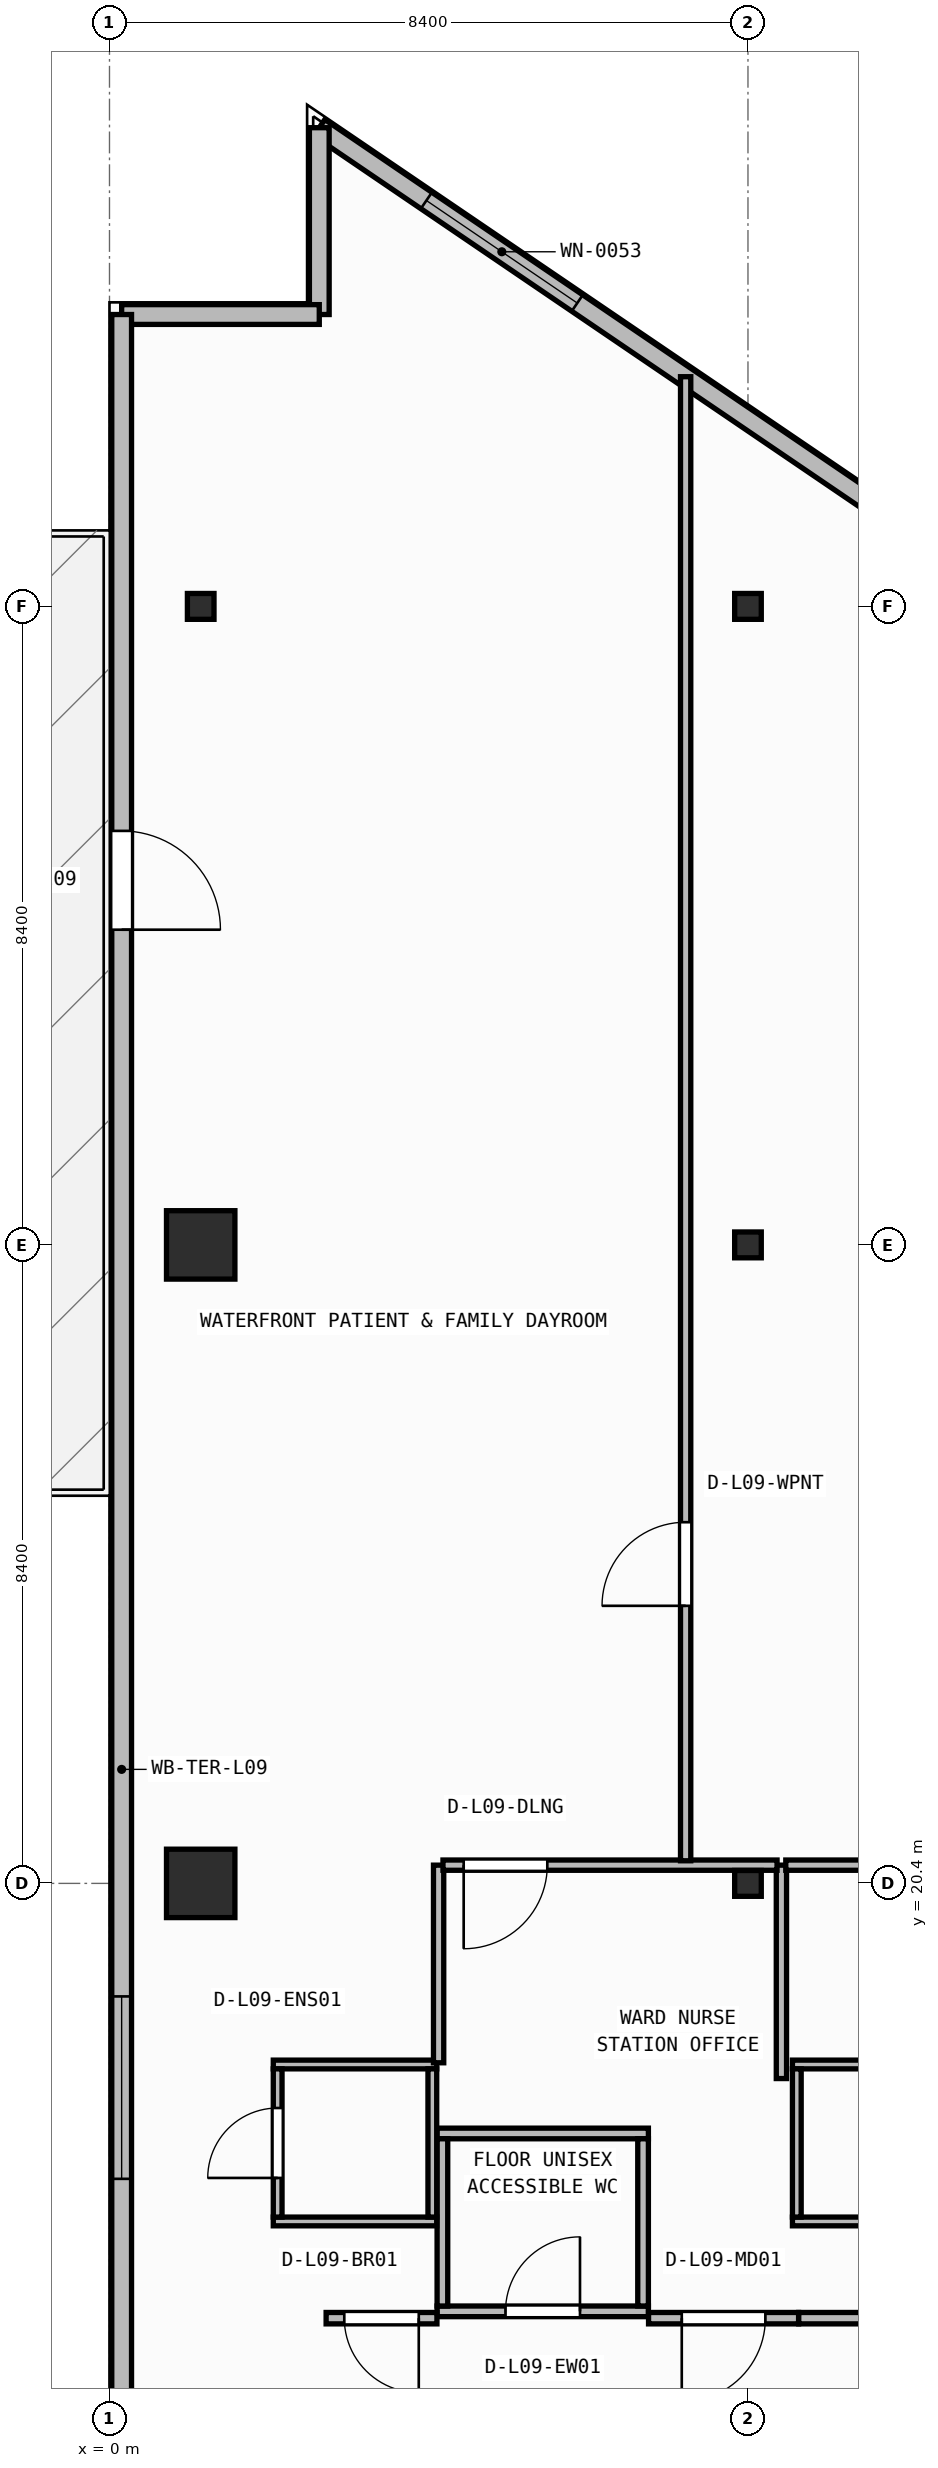
"""IFC4 building model, lengths in metres.
Left out: names, types, materials, properties, quantities, classifications, styles, units other than length and angle.
Written with IfcOpenShell. Run it as: python <this file> out.ifc"""

import sys

from ifc_helpers import new_model, si_unit, direction, frame, frame_2d, origin, origin_2d, place, context, subcontext, project, spatial, rectangle, i_section, extrude, element, fill, save


model = new_model("IFC4")
c1 = context("Model", 3, precision=1e-05, world=origin(), true_north=direction((0.0, 1.0)))
c2 = subcontext(c1, "Body", "Model", "MODEL_VIEW")
j1 = project(units=[si_unit("LENGTHUNIT", "METRE"), si_unit("PLANEANGLEUNIT", "RADIAN")], contexts=[c1])
p1 = place(None, origin())
s1 = spatial("IfcSite", under=j1, at=p1, CompositionType="ELEMENT")
p2 = place(p1, origin())
s2 = spatial("IfcBuilding", under=s1, at=p2, CompositionType="ELEMENT")
p3 = place(p2, frame((0.0, 0.0, 38.3)))
s3 = spatial("IfcBuildingStorey", under=s2, at=p3, CompositionType="ELEMENT", Elevation=38.3)
p4 = place(p3, frame((1.2, 20.4, 0.0), z_axis=(0.0, 0.0, 1.0), x_axis=(1.0, 0.0, 0.0)))
e1 = element("IfcColumn", 1, at=p4, inside=s3, PredefinedType="COLUMN", context=c2, shape_type="SweptSolid", body=[
    extrude(rectangle(XDim=0.9, YDim=0.9, at=origin_2d()), origin(), (0.0, 0.0, 1.0), 3.95),
])
p5 = place(p3, frame((8.4, 20.4, 0.0), z_axis=(0.0, 0.0, 1.0), x_axis=(1.0, 0.0, 0.0)))
e2 = element("IfcColumn", 2, at=p5, inside=s3, PredefinedType="COLUMN", context=c2, shape_type="SweptSolid", body=[
    extrude(i_section(OverallWidth=0.35, OverallDepth=0.34, WebThickness=0.016, FlangeThickness=0.028, at=origin_2d()), origin(), (0.0, 0.0, 1.0), 3.95),
])
p6 = place(p3, frame((1.2, 28.8, 0.0), z_axis=(0.0, 0.0, 1.0), x_axis=(1.0, 0.0, 0.0)))
e3 = element("IfcColumn", 3, at=p6, inside=s3, PredefinedType="COLUMN", context=c2, shape_type="SweptSolid", body=[
    extrude(rectangle(XDim=0.9, YDim=0.9, at=origin_2d()), origin(), (0.0, 0.0, 1.0), 3.95),
])
for number, where, z_axis, x_axis in (
    (4, (8.4, 28.8, 0.0), (0.0, 0.0, 1.0), (1.0, 0.0, 0.0)),
    (5, (1.2, 37.2, 0.0), (0.0, 0.0, 1.0), (1.0, 0.0, 0.0)),
    (6, (8.4, 37.2, 0.0), (0.0, 0.0, 1.0), (1.0, 0.0, 0.0)),
):
    element("IfcColumn", number, at=place(p3, frame(where, z_axis=z_axis, x_axis=x_axis)), inside=s3, PredefinedType="COLUMN", context=c2, shape_type="SweptSolid", body=[
        extrude(i_section(OverallWidth=0.35, OverallDepth=0.34, WebThickness=0.016, FlangeThickness=0.028, at=origin_2d()), origin(), (0.0, 0.0, 1.0), 3.95),
    ])
p7 = place(p3, frame((11.561, 37.517, 0.0), z_axis=(0.0, 0.0, 1.0), x_axis=(-0.827064743936, 0.562106670782, 0.0)))
e7 = element("IfcWall", 7, at=p7, inside=s3, PredefinedType="STANDARD", context=c2, shape_type="SweptSolid", body=[
    extrude(rectangle(XDim=10.641, YDim=0.26, at=frame_2d((5.32, 0.0))), origin(), (0.0, 0.0, 1.0), 3.71),
])
p8 = place(p7, frame((6.537, 0.0, 0.9)))
e8 = element("IfcOpeningElement", 8, at=p8, cuts=e7, PredefinedType="OPENING", context=c2, shape_type="SweptSolid", body=[
    extrude(rectangle(XDim=2.4, YDim=1.65, at=frame_2d((1.2, 0.825))), frame((0.0, 0.14, 0.0), z_axis=(0.0, -1.0, 0.0), x_axis=(1.0, 0.0, 0.0)), (0.0, 0.0, 1.0), 0.28),
])
p9 = place(p3, frame((2.76, 43.498, 0.0), z_axis=(0.0, 0.0, 1.0), x_axis=(0.0, -1.0, 0.0)))
e9 = element("IfcWall", 9, at=p9, inside=s3, PredefinedType="STANDARD", context=c2, shape_type="SweptSolid", body=[
    extrude(rectangle(XDim=2.458, YDim=0.26, at=frame_2d((1.229, 0.0))), origin(), (0.0, 0.0, 1.0), 3.71),
])
p10 = place(p3, frame((2.76, 41.04, 0.0), z_axis=(0.0, 0.0, 1.0), x_axis=(-1.0, 0.0, 0.0)))
e10 = element("IfcWall", 10, at=p10, inside=s3, PredefinedType="STANDARD", context=c2, shape_type="SweptSolid", body=[
    extrude(rectangle(XDim=2.6, YDim=0.26, at=frame_2d((1.3, 0.0))), origin(), (0.0, 0.0, 1.0), 3.71),
])
p11 = place(p3, frame((0.16, 41.04, 0.0), z_axis=(0.0, 0.0, 1.0), x_axis=(0.0, -1.0, 0.0)))
e11 = element("IfcWall", 11, at=p11, inside=s3, PredefinedType="STANDARD", context=c2, shape_type="SweptSolid", body=[
    extrude(rectangle(XDim=38.28, YDim=0.26, at=frame_2d((19.14, 0.0))), origin(), (0.0, 0.0, 1.0), 3.71),
])
p12 = place(p11, frame((6.793, 0.0, 0.0)))
e12 = element("IfcOpeningElement", 12, at=p12, cuts=e11, PredefinedType="OPENING", context=c2, shape_type="SweptSolid", body=[
    extrude(rectangle(XDim=1.3, YDim=2.15, at=frame_2d((0.65, 1.075))), frame((0.0, 0.14, 0.0), z_axis=(0.0, -1.0, 0.0), x_axis=(1.0, 0.0, 0.0)), (0.0, 0.0, 1.0), 0.28),
])
p13 = place(p11, frame((22.127, 0.0, 0.9)))
e13 = element("IfcOpeningElement", 13, at=p13, cuts=e11, PredefinedType="OPENING", context=c2, shape_type="SweptSolid", body=[
    extrude(rectangle(XDim=2.4, YDim=1.65, at=frame_2d((1.2, 0.825))), frame((0.0, 0.14, 0.0), z_axis=(0.0, -1.0, 0.0), x_axis=(1.0, 0.0, 0.0)), (0.0, 0.0, 1.0), 0.28),
])
p14 = place(p3, frame((4.31, 14.77, 0.0), z_axis=(0.0, 0.0, 1.0), x_axis=(1.0, 0.0, 0.0)))
e14 = element("IfcWall", 14, at=p14, inside=s3, PredefinedType="PARTITIONING", context=c2, shape_type="SweptSolid", body=[
    extrude(rectangle(XDim=2.78, YDim=0.14, at=frame_2d((1.39, 0.0))), origin(), (0.0, 0.0, 1.0), 3.71),
])
p15 = place(p14, frame((0.9, 0.0, 0.0)))
e15 = element("IfcOpeningElement", 15, at=p15, cuts=e14, PredefinedType="OPENING", context=c2, shape_type="SweptSolid", body=[
    extrude(rectangle(XDim=0.98, YDim=2.1, at=frame_2d((0.49, 1.05))), frame((0.0, 0.08, 0.0), z_axis=(0.0, -1.0, 0.0), x_axis=(1.0, 0.0, 0.0)), (0.0, 0.0, 1.0), 0.16),
])
p16 = place(p3, frame((4.31, 17.11, 0.0), z_axis=(0.0, 0.0, 1.0), x_axis=(1.0, 0.0, 0.0)))
e16 = element("IfcWall", 16, at=p16, inside=s3, PredefinedType="PARTITIONING", context=c2, shape_type="SweptSolid", body=[
    extrude(rectangle(XDim=2.78, YDim=0.14, at=frame_2d((1.39, 0.0))), origin(), (0.0, 0.0, 1.0), 3.71),
])
for number, where, z_axis, x_axis in (
    (17, (4.38, 14.84, 0.0), (0.0, 0.0, 1.0), (0.0, 1.0, 0.0)),
    (18, (7.02, 14.84, 0.0), (0.0, 0.0, 1.0), (0.0, 1.0, 0.0)),
):
    element("IfcWall", number, at=place(p3, frame(where, z_axis=z_axis, x_axis=x_axis)), inside=s3, PredefinedType="PARTITIONING", context=c2, shape_type="SweptSolid", body=[
        extrude(rectangle(XDim=2.2, YDim=0.14, at=frame_2d((1.1, 0.0))), origin(), (0.0, 0.0, 1.0), 3.71),
    ])
for number, where, z_axis, x_axis in (
    (19, (2.155, 15.952, 0.0), (0.0, 0.0, 1.0), (1.0, 0.0, 0.0)),
    (20, (2.155, 18.018, 0.0), (0.0, 0.0, 1.0), (1.0, 0.0, 0.0)),
):
    element("IfcWall", number, at=place(p3, frame(where, z_axis=z_axis, x_axis=x_axis)), inside=s3, PredefinedType="PARTITIONING", context=c2, shape_type="SweptSolid", body=[
        extrude(rectangle(XDim=2.15, YDim=0.115, at=frame_2d((1.075, 0.0))), origin(), (0.0, 0.0, 1.0), 3.71),
    ])
p17 = place(p3, frame((2.212, 16.01, 0.0), z_axis=(0.0, 0.0, 1.0), x_axis=(0.0, 1.0, 0.0)))
e21 = element("IfcWall", 21, at=p17, inside=s3, PredefinedType="PARTITIONING", context=c2, shape_type="SweptSolid", body=[
    extrude(rectangle(XDim=1.95, YDim=0.115, at=frame_2d((0.975, 0.0))), origin(), (0.0, 0.0, 1.0), 3.71),
])
p18 = place(p17, frame((0.515, 0.0, 0.0)))
e22 = element("IfcOpeningElement", 22, at=p18, cuts=e21, PredefinedType="OPENING", context=c2, shape_type="SweptSolid", body=[
    extrude(rectangle(XDim=0.92, YDim=2.1, at=frame_2d((0.46, 1.05))), frame((0.0, 0.067, 0.0), z_axis=(0.0, -1.0, 0.0), x_axis=(1.0, 0.0, 0.0)), (0.0, 0.0, 1.0), 0.135),
])
p19 = place(p3, frame((4.248, 16.01, 0.0), z_axis=(0.0, 0.0, 1.0), x_axis=(0.0, 1.0, 0.0)))
e23 = element("IfcWall", 23, at=p19, inside=s3, PredefinedType="PARTITIONING", context=c2, shape_type="SweptSolid", body=[
    extrude(rectangle(XDim=1.95, YDim=0.115, at=frame_2d((0.975, 0.0))), origin(), (0.0, 0.0, 1.0), 3.71),
])
for number, where, z_axis, x_axis in (
    (24, (8.985, 15.952, 0.0), (0.0, 0.0, 1.0), (1.0, 0.0, 0.0)),
    (25, (8.985, 18.018, 0.0), (0.0, 0.0, 1.0), (1.0, 0.0, 0.0)),
):
    element("IfcWall", number, at=place(p3, frame(where, z_axis=z_axis, x_axis=x_axis)), inside=s3, PredefinedType="PARTITIONING", context=c2, shape_type="SweptSolid", body=[
        extrude(rectangle(XDim=2.15, YDim=0.115, at=frame_2d((1.075, 0.0))), origin(), (0.0, 0.0, 1.0), 3.71),
    ])
p20 = place(p3, frame((9.042, 16.01, 0.0), z_axis=(0.0, 0.0, 1.0), x_axis=(0.0, 1.0, 0.0)))
e26 = element("IfcWall", 26, at=p20, inside=s3, PredefinedType="PARTITIONING", context=c2, shape_type="SweptSolid", body=[
    extrude(rectangle(XDim=1.95, YDim=0.115, at=frame_2d((0.975, 0.0))), origin(), (0.0, 0.0, 1.0), 3.71),
])
p21 = place(p3, frame((4.308, 14.68, 0.0), z_axis=(0.0, 0.0, 1.0), x_axis=(-1.0, 0.0, 0.0)))
e27 = element("IfcWall", 27, at=p21, inside=s3, PredefinedType="PARTITIONING", context=c2, shape_type="SweptSolid", body=[
    extrude(rectangle(XDim=1.458, YDim=0.15, at=frame_2d((0.729, 0.0))), origin(), (0.0, 0.0, 1.0), 3.71),
])
p22 = place(p21, frame((0.239, 0.0, 0.0)))
e28 = element("IfcOpeningElement", 28, at=p22, cuts=e27, PredefinedType="OPENING", context=c2, shape_type="SweptSolid", body=[
    extrude(rectangle(XDim=0.98, YDim=2.1, at=frame_2d((0.49, 1.05))), frame((0.0, 0.085, 0.0), z_axis=(0.0, -1.0, 0.0), x_axis=(1.0, 0.0, 0.0)), (0.0, 0.0, 1.0), 0.17),
])
p23 = place(p3, frame((9.066, 14.68, 0.0), z_axis=(0.0, 0.0, 1.0), x_axis=(-1.0, 0.0, 0.0)))
e29 = element("IfcWall", 29, at=p23, inside=s3, PredefinedType="PARTITIONING", context=c2, shape_type="SweptSolid", body=[
    extrude(rectangle(XDim=1.974, YDim=0.15, at=frame_2d((0.987, 0.0))), origin(), (0.0, 0.0, 1.0), 3.71),
])
p24 = place(p23, frame((0.437, 0.0, 0.0)))
e30 = element("IfcOpeningElement", 30, at=p24, cuts=e29, PredefinedType="OPENING", context=c2, shape_type="SweptSolid", body=[
    extrude(rectangle(XDim=1.1, YDim=2.1, at=frame_2d((0.55, 1.05))), frame((0.0, 0.085, 0.0), z_axis=(0.0, -1.0, 0.0), x_axis=(1.0, 0.0, 0.0)), (0.0, 0.0, 1.0), 0.17),
])
p25 = place(p3, frame((13.936, 14.68, 0.0), z_axis=(0.0, 0.0, 1.0), x_axis=(-1.0, 0.0, 0.0)))
e31 = element("IfcWall", 31, at=p25, inside=s3, PredefinedType="PARTITIONING", context=c2, shape_type="SweptSolid", body=[
    extrude(rectangle(XDim=4.868, YDim=0.15, at=frame_2d((2.434, 0.0))), origin(), (0.0, 0.0, 1.0), 3.71),
])
p26 = place(p25, frame((1.784, 0.0, 0.0)))
e32 = element("IfcOpeningElement", 32, at=p26, cuts=e31, PredefinedType="OPENING", context=c2, shape_type="SweptSolid", body=[
    extrude(rectangle(XDim=1.3, YDim=2.15, at=frame_2d((0.65, 1.075))), frame((0.0, 0.085, 0.0), z_axis=(0.0, -1.0, 0.0), x_axis=(1.0, 0.0, 0.0)), (0.0, 0.0, 1.0), 0.17),
])
p27 = place(p3, frame((4.33, 18.04, 0.0), z_axis=(0.0, 0.0, 1.0), x_axis=(0.0, 1.0, 0.0)))
e33 = element("IfcWall", 33, at=p27, inside=s3, PredefinedType="PARTITIONING", context=c2, shape_type="SweptSolid", body=[
    extrude(rectangle(XDim=2.6, YDim=0.135, at=frame_2d((1.3, 0.0))), origin(), (0.0, 0.0, 1.0), 3.71),
])
p28 = place(p3, frame((8.84, 17.833, 0.0), z_axis=(0.0, 0.0, 1.0), x_axis=(0.0, 1.0, 0.0)))
e34 = element("IfcWall", 34, at=p28, inside=s3, PredefinedType="PARTITIONING", context=c2, shape_type="SweptSolid", body=[
    extrude(rectangle(XDim=2.807, YDim=0.135, at=frame_2d((1.404, 0.0))), origin(), (0.0, 0.0, 1.0), 3.71),
])
p29 = place(p3, frame((8.782, 20.64, 0.0), z_axis=(0.0, 0.0, 1.0), x_axis=(-1.0, 0.0, 0.0)))
e35 = element("IfcWall", 35, at=p29, inside=s3, PredefinedType="PARTITIONING", context=c2, shape_type="SweptSolid", body=[
    extrude(rectangle(XDim=4.395, YDim=0.135, at=frame_2d((2.198, 0.0))), origin(), (0.0, 0.0, 1.0), 3.073),
])
p30 = place(p29, frame((3.023, 0.0, 0.0)))
e36 = element("IfcOpeningElement", 36, at=p30, cuts=e35, PredefinedType="OPENING", context=c2, shape_type="SweptSolid", body=[
    extrude(rectangle(XDim=1.1, YDim=2.1, at=frame_2d((0.55, 1.05))), frame((0.0, 0.077, 0.0), z_axis=(0.0, -1.0, 0.0), x_axis=(1.0, 0.0, 0.0)), (0.0, 0.0, 1.0), 0.155),
])
p31 = place(p3, frame((13.71, 20.64, 0.0), z_axis=(0.0, 0.0, 1.0), x_axis=(-1.0, 0.0, 0.0)))
e37 = element("IfcWall", 37, at=p31, inside=s3, PredefinedType="PARTITIONING", context=c2, shape_type="SweptSolid", body=[
    extrude(rectangle(XDim=4.812, YDim=0.135, at=frame_2d((2.406, 0.0))), origin(), (0.0, 0.0, 1.0), 3.073),
])
p32 = place(p3, frame((7.58, 20.698, 0.0), z_axis=(0.0, 0.0, 1.0), x_axis=(0.0, 1.0, 0.0)))
e38 = element("IfcWall", 38, at=p32, inside=s3, PredefinedType="PARTITIONING", context=c2, shape_type="SweptSolid", body=[
    extrude(rectangle(XDim=19.524, YDim=0.135, at=frame_2d((9.762, 0.0))), origin(), (0.0, 0.0, 1.0), 3.71),
])
p33 = place(p32, frame((3.354, 0.0, 0.0)))
e39 = element("IfcOpeningElement", 39, at=p33, cuts=e38, PredefinedType="OPENING", context=c2, shape_type="SweptSolid", body=[
    extrude(rectangle(XDim=1.1, YDim=2.1, at=frame_2d((0.55, 1.05))), frame((0.0, 0.077, 0.0), z_axis=(0.0, -1.0, 0.0), x_axis=(1.0, 0.0, 0.0)), (0.0, 0.0, 1.0), 0.155),
])
p34 = place(p8, origin())
e40 = element("IfcWindow", 40, at=p34, inside=s3, PartitioningType="SINGLE_PANEL", PredefinedType="WINDOW", context=c2, shape_type="SweptSolid", body=[
    extrude(rectangle(XDim=2.4, YDim=1.65, at=frame_2d((1.2, 0.825))), frame((0.0, 0.03, 0.0), z_axis=(0.0, -1.0, 0.0), x_axis=(1.0, 0.0, 0.0)), (0.0, 0.0, 1.0), 0.06),
])
fill(e8, e40)
p35 = place(p12, origin())
e41 = element("IfcDoor", 41, at=p35, inside=s3, OperationType="SINGLE_SWING_RIGHT", PredefinedType="DOOR", context=c2, shape_type="SweptSolid", body=[
    extrude(rectangle(XDim=1.3, YDim=2.15, at=frame_2d((0.65, 1.075))), frame((0.0, 0.025, 0.0), z_axis=(0.0, -1.0, 0.0), x_axis=(1.0, 0.0, 0.0)), (0.0, 0.0, 1.0), 0.05),
])
fill(e12, e41)
p36 = place(p15, origin())
e42 = element("IfcDoor", 42, at=p36, inside=s3, OperationType="SINGLE_SWING_RIGHT", PredefinedType="DOOR", context=c2, shape_type="SweptSolid", body=[
    extrude(rectangle(XDim=0.98, YDim=2.1, at=frame_2d((0.49, 1.05))), frame((0.0, 0.025, 0.0), z_axis=(0.0, -1.0, 0.0), x_axis=(1.0, 0.0, 0.0)), (0.0, 0.0, 1.0), 0.05),
])
fill(e15, e42)
p37 = place(p18, origin())
e43 = element("IfcDoor", 43, at=p37, inside=s3, OperationType="SINGLE_SWING_LEFT", PredefinedType="DOOR", context=c2, shape_type="SweptSolid", body=[
    extrude(rectangle(XDim=0.92, YDim=2.1, at=frame_2d((0.46, 1.05))), frame((0.0, 0.025, 0.0), z_axis=(0.0, -1.0, 0.0), x_axis=(1.0, 0.0, 0.0)), (0.0, 0.0, 1.0), 0.05),
])
fill(e22, e43)
p38 = place(p22, origin())
e44 = element("IfcDoor", 44, at=p38, inside=s3, OperationType="SINGLE_SWING_LEFT", PredefinedType="DOOR", context=c2, shape_type="SweptSolid", body=[
    extrude(rectangle(XDim=0.98, YDim=2.1, at=frame_2d((0.49, 1.05))), frame((0.0, 0.025, 0.0), z_axis=(0.0, -1.0, 0.0), x_axis=(1.0, 0.0, 0.0)), (0.0, 0.0, 1.0), 0.05),
])
fill(e28, e44)
p39 = place(p24, origin())
e45 = element("IfcDoor", 45, at=p39, inside=s3, OperationType="SINGLE_SWING_RIGHT", PredefinedType="DOOR", context=c2, shape_type="SweptSolid", body=[
    extrude(rectangle(XDim=1.1, YDim=2.1, at=frame_2d((0.55, 1.05))), frame((0.0, 0.025, 0.0), z_axis=(0.0, -1.0, 0.0), x_axis=(1.0, 0.0, 0.0)), (0.0, 0.0, 1.0), 0.05),
])
fill(e30, e45)
p40 = place(p30, origin())
e46 = element("IfcDoor", 46, at=p40, inside=s3, OperationType="SINGLE_SWING_RIGHT", PredefinedType="DOOR", context=c2, shape_type="SweptSolid", body=[
    extrude(rectangle(XDim=1.1, YDim=2.1, at=frame_2d((0.55, 1.05))), frame((0.0, 0.025, 0.0), z_axis=(0.0, -1.0, 0.0), x_axis=(1.0, 0.0, 0.0)), (0.0, 0.0, 1.0), 0.05),
])
fill(e36, e46)
p41 = place(p33, origin())
e47 = element("IfcDoor", 47, at=p41, inside=s3, OperationType="SINGLE_SWING_LEFT", PredefinedType="DOOR", context=c2, shape_type="SweptSolid", body=[
    extrude(rectangle(XDim=1.1, YDim=2.1, at=frame_2d((0.55, 1.05))), frame((0.0, 0.025, 0.0), z_axis=(0.0, -1.0, 0.0), x_axis=(1.0, 0.0, 0.0)), (0.0, 0.0, 1.0), 0.05),
])
fill(e39, e47)
p42 = place(p13, origin())
e48 = element("IfcWindow", 48, at=p42, inside=s3, PartitioningType="SINGLE_PANEL", PredefinedType="WINDOW", context=c2, shape_type="SweptSolid", body=[
    extrude(rectangle(XDim=2.4, YDim=1.65, at=frame_2d((1.2, 0.825))), frame((0.0, 0.03, 0.0), z_axis=(0.0, -1.0, 0.0), x_axis=(1.0, 0.0, 0.0)), (0.0, 0.0, 1.0), 0.06),
])
fill(e13, e48)
save(model, sys.argv[1])
